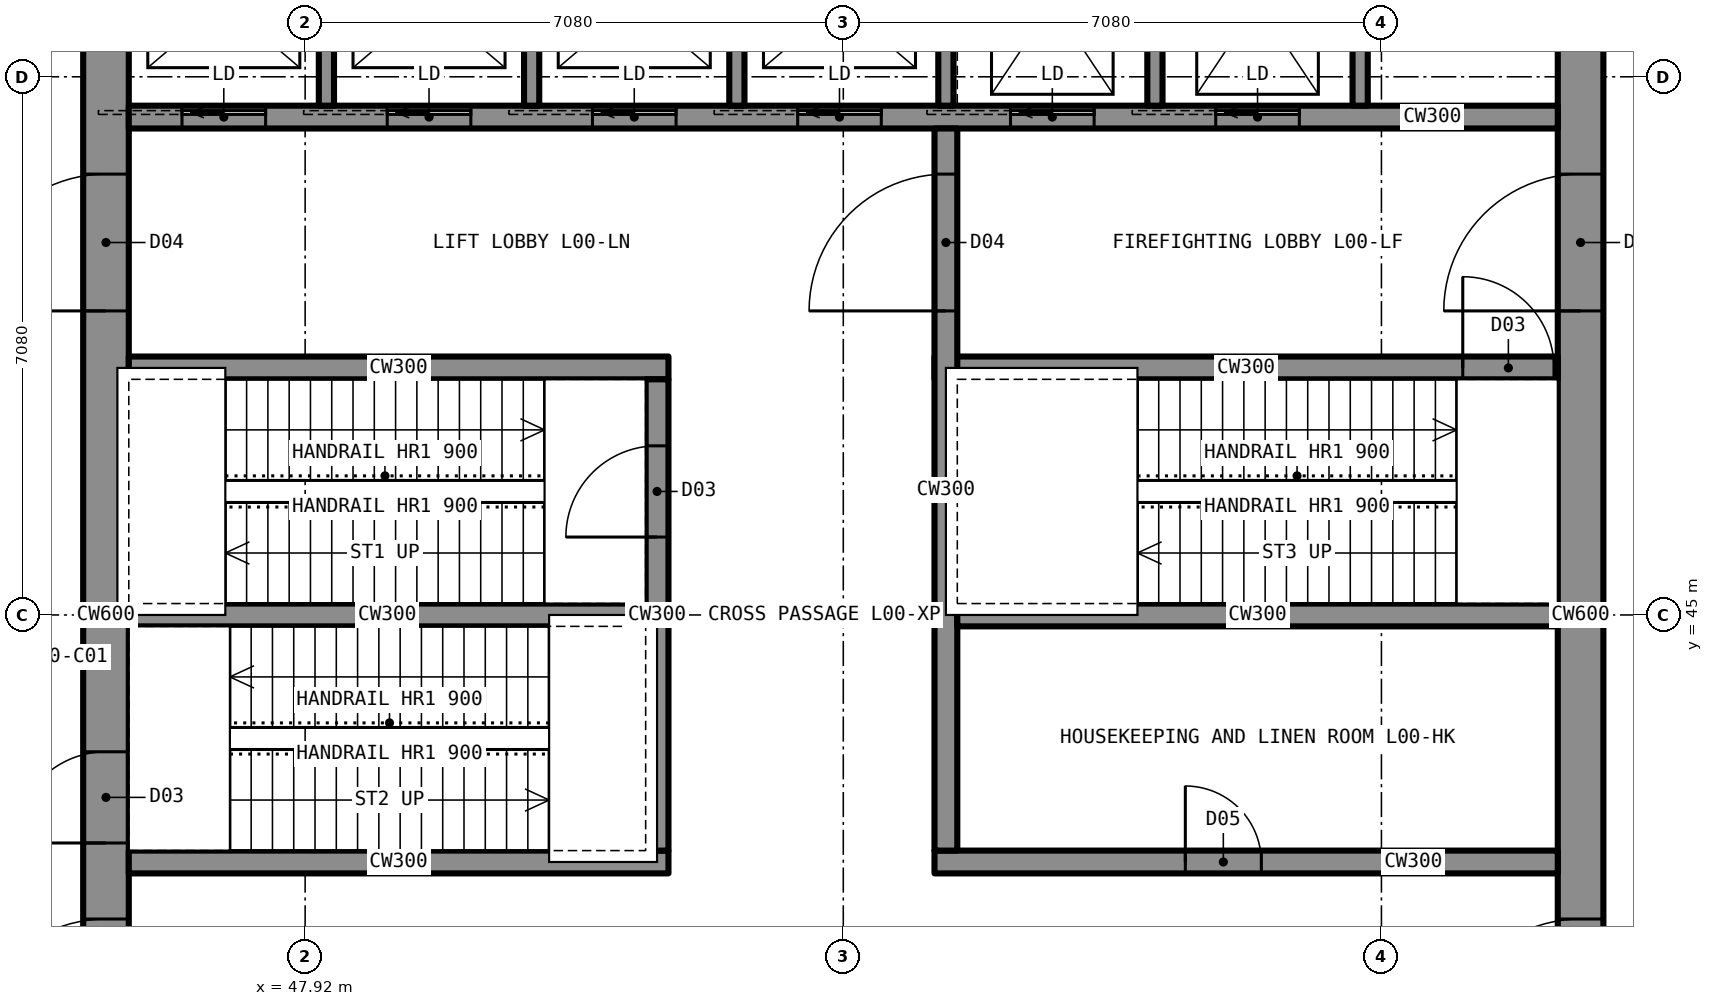
"""IFC4 building model, lengths in metres.
Left out: names, types, materials, properties, quantities, classifications, styles, units other than length and angle.
Written with IfcOpenShell. Run it as: python <this file> out.ifc"""

import sys

from ifc_helpers import new_model, si_unit, direction, frame, frame_2d, origin, place, context, subcontext, project, spatial, rectangle, extrude, element, fill, save


model = new_model("IFC4")
c1 = context("Model", 3, precision=1e-05, world=origin(), true_north=direction((0.0, 1.0)))
c2 = subcontext(c1, "Body", "Model", "MODEL_VIEW")
j1 = project(units=[si_unit("LENGTHUNIT", "METRE"), si_unit("PLANEANGLEUNIT", "RADIAN")], contexts=[c1])
p1 = place(None, origin())
s1 = spatial("IfcSite", under=j1, at=p1, CompositionType="ELEMENT")
p2 = place(p1, origin())
s2 = spatial("IfcBuilding", under=s1, at=p2, CompositionType="ELEMENT")
p3 = place(p2, origin())
s3 = spatial("IfcBuildingStorey", under=s2, at=p3, CompositionType="ELEMENT", Elevation=0.0)
p4 = place(p3, frame((64.7, 35.6, 0.0), z_axis=(0.0, 0.0, 1.0), x_axis=(0.0, 1.0, 0.0)))
e1 = element("IfcWall", 1, at=p4, inside=s3, PredefinedType="SHEAR", context=c2, shape_type="SweptSolid", body=[
    extrude(rectangle(XDim=18.8, YDim=0.6, at=frame_2d((9.4, 0.0))), origin(), (0.0, 0.0, 1.0), 5.6),
])
p5 = place(p4, frame((13.4, 0.0, 0.0)))
e2 = element("IfcOpeningElement", 2, at=p5, cuts=e1, PredefinedType="OPENING", context=c2, shape_type="SweptSolid", body=[
    extrude(rectangle(XDim=1.8, YDim=2.2, at=frame_2d((0.9, 1.1))), frame((0.0, 0.31, 0.0), z_axis=(0.0, -1.0, 0.0), x_axis=(1.0, 0.0, 0.0)), (0.0, 0.0, 1.0), 0.62),
])
p6 = place(p4, frame((3.6, 0.0, 0.0)))
e3 = element("IfcOpeningElement", 3, at=p6, cuts=e1, PredefinedType="OPENING", context=c2, shape_type="SweptSolid", body=[
    extrude(rectangle(XDim=1.8, YDim=2.2, at=frame_2d((0.9, 1.1))), frame((0.0, 0.31, 0.0), z_axis=(0.0, -1.0, 0.0), x_axis=(1.0, 0.0, 0.0)), (0.0, 0.0, 1.0), 0.62),
])
p7 = place(p3, frame((45.3, 35.6, 0.0), z_axis=(0.0, 0.0, 1.0), x_axis=(0.0, 1.0, 0.0)))
e4 = element("IfcWall", 4, at=p7, inside=s3, PredefinedType="SHEAR", context=c2, shape_type="SweptSolid", body=[
    extrude(rectangle(XDim=18.8, YDim=0.6, at=frame_2d((9.4, 0.0))), origin(), (0.0, 0.0, 1.0), 5.6),
])
p8 = place(p7, frame((13.4, 0.0, 0.0)))
e5 = element("IfcOpeningElement", 5, at=p8, cuts=e4, PredefinedType="OPENING", context=c2, shape_type="SweptSolid", body=[
    extrude(rectangle(XDim=1.8, YDim=2.2, at=frame_2d((0.9, 1.1))), frame((0.0, 0.31, 0.0), z_axis=(0.0, -1.0, 0.0), x_axis=(1.0, 0.0, 0.0)), (0.0, 0.0, 1.0), 0.62),
])
p9 = place(p7, frame((3.6, 0.0, 0.0)))
e6 = element("IfcOpeningElement", 6, at=p9, cuts=e4, PredefinedType="OPENING", context=c2, shape_type="SweptSolid", body=[
    extrude(rectangle(XDim=1.8, YDim=2.2, at=frame_2d((0.9, 1.1))), frame((0.0, 0.31, 0.0), z_axis=(0.0, -1.0, 0.0), x_axis=(1.0, 0.0, 0.0)), (0.0, 0.0, 1.0), 0.62),
])
p10 = place(p7, frame((6.4, 0.0, 0.0)))
e7 = element("IfcOpeningElement", 7, at=p10, cuts=e4, PredefinedType="OPENING", context=c2, shape_type="SweptSolid", body=[
    extrude(rectangle(XDim=1.2, YDim=2.2, at=frame_2d((0.6, 1.1))), frame((0.0, 0.31, 0.0), z_axis=(0.0, -1.0, 0.0), x_axis=(1.0, 0.0, 0.0)), (0.0, 0.0, 1.0), 0.62),
])
p11 = place(p3, frame((45.6, 51.55, 0.0), z_axis=(0.0, 0.0, 1.0), x_axis=(1.0, 0.0, 0.0)))
e8 = element("IfcWall", 8, at=p11, inside=s3, PredefinedType="SHEAR", context=c2, shape_type="SweptSolid", body=[
    extrude(rectangle(XDim=18.8, YDim=0.3, at=frame_2d((9.4, 0.0))), origin(), (0.0, 0.0, 1.0), 5.6),
])
p12 = place(p11, frame((0.7, 0.0, 0.0)))
e9 = element("IfcOpeningElement", 9, at=p12, cuts=e8, PredefinedType="OPENING", context=c2, shape_type="SweptSolid", body=[
    extrude(rectangle(XDim=1.1, YDim=2.2, at=frame_2d((0.55, 1.1))), frame((0.0, 0.16, 0.0), z_axis=(0.0, -1.0, 0.0), x_axis=(1.0, 0.0, 0.0)), (0.0, 0.0, 1.0), 0.32),
])
p13 = place(p11, frame((3.4, 0.0, 0.0)))
e10 = element("IfcOpeningElement", 10, at=p13, cuts=e8, PredefinedType="OPENING", context=c2, shape_type="SweptSolid", body=[
    extrude(rectangle(XDim=1.1, YDim=2.2, at=frame_2d((0.55, 1.1))), frame((0.0, 0.16, 0.0), z_axis=(0.0, -1.0, 0.0), x_axis=(1.0, 0.0, 0.0)), (0.0, 0.0, 1.0), 0.32),
])
p14 = place(p11, frame((6.1, 0.0, 0.0)))
e11 = element("IfcOpeningElement", 11, at=p14, cuts=e8, PredefinedType="OPENING", context=c2, shape_type="SweptSolid", body=[
    extrude(rectangle(XDim=1.1, YDim=2.2, at=frame_2d((0.55, 1.1))), frame((0.0, 0.16, 0.0), z_axis=(0.0, -1.0, 0.0), x_axis=(1.0, 0.0, 0.0)), (0.0, 0.0, 1.0), 0.32),
])
p15 = place(p11, frame((8.8, 0.0, 0.0)))
e12 = element("IfcOpeningElement", 12, at=p15, cuts=e8, PredefinedType="OPENING", context=c2, shape_type="SweptSolid", body=[
    extrude(rectangle(XDim=1.1, YDim=2.2, at=frame_2d((0.55, 1.1))), frame((0.0, 0.16, 0.0), z_axis=(0.0, -1.0, 0.0), x_axis=(1.0, 0.0, 0.0)), (0.0, 0.0, 1.0), 0.32),
])
p16 = place(p11, frame((11.6, 0.0, 0.0)))
e13 = element("IfcOpeningElement", 13, at=p16, cuts=e8, PredefinedType="OPENING", context=c2, shape_type="SweptSolid", body=[
    extrude(rectangle(XDim=1.1, YDim=2.2, at=frame_2d((0.55, 1.1))), frame((0.0, 0.16, 0.0), z_axis=(0.0, -1.0, 0.0), x_axis=(1.0, 0.0, 0.0)), (0.0, 0.0, 1.0), 0.32),
])
p17 = place(p11, frame((14.3, 0.0, 0.0)))
e14 = element("IfcOpeningElement", 14, at=p17, cuts=e8, PredefinedType="OPENING", context=c2, shape_type="SweptSolid", body=[
    extrude(rectangle(XDim=1.1, YDim=2.2, at=frame_2d((0.55, 1.1))), frame((0.0, 0.16, 0.0), z_axis=(0.0, -1.0, 0.0), x_axis=(1.0, 0.0, 0.0)), (0.0, 0.0, 1.0), 0.32),
])
p18 = place(p3, frame((45.6, 48.25, 0.0), z_axis=(0.0, 0.0, 1.0), x_axis=(1.0, 0.0, 0.0)))
e15 = element("IfcWall", 15, at=p18, inside=s3, PredefinedType="SHEAR", context=c2, shape_type="SweptSolid", body=[
    extrude(rectangle(XDim=7.1, YDim=0.3, at=frame_2d((3.55, 0.0))), origin(), (0.0, 0.0, 1.0), 5.6),
])
p19 = place(p3, frame((56.2, 48.25, 0.0), z_axis=(0.0, 0.0, 1.0), x_axis=(1.0, 0.0, 0.0)))
e16 = element("IfcWall", 16, at=p19, inside=s3, PredefinedType="SHEAR", context=c2, shape_type="SweptSolid", body=[
    extrude(rectangle(XDim=8.2, YDim=0.3, at=frame_2d((4.1, 0.0))), origin(), (0.0, 0.0, 1.0), 5.6),
])
p20 = place(p19, frame((6.95, 0.0, 0.0)))
e17 = element("IfcOpeningElement", 17, at=p20, cuts=e16, PredefinedType="OPENING", context=c2, shape_type="SweptSolid", body=[
    extrude(rectangle(XDim=1.2, YDim=2.2, at=frame_2d((0.6, 1.1))), frame((0.0, 0.16, 0.0), z_axis=(0.0, -1.0, 0.0), x_axis=(1.0, 0.0, 0.0)), (0.0, 0.0, 1.0), 0.32),
])
p21 = place(p3, frame((45.6, 41.75, 0.0), z_axis=(0.0, 0.0, 1.0), x_axis=(1.0, 0.0, 0.0)))
e18 = element("IfcWall", 18, at=p21, inside=s3, PredefinedType="SHEAR", context=c2, shape_type="SweptSolid", body=[
    extrude(rectangle(XDim=7.1, YDim=0.3, at=frame_2d((3.55, 0.0))), origin(), (0.0, 0.0, 1.0), 5.6),
])
p22 = place(p3, frame((56.2, 41.75, 0.0), z_axis=(0.0, 0.0, 1.0), x_axis=(1.0, 0.0, 0.0)))
e19 = element("IfcWall", 19, at=p22, inside=s3, PredefinedType="SHEAR", context=c2, shape_type="SweptSolid", body=[
    extrude(rectangle(XDim=8.2, YDim=0.3, at=frame_2d((4.1, 0.0))), origin(), (0.0, 0.0, 1.0), 5.6),
])
p23 = place(p22, frame((3.3, 0.0, 0.0)))
e20 = element("IfcOpeningElement", 20, at=p23, cuts=e19, PredefinedType="OPENING", context=c2, shape_type="SweptSolid", body=[
    extrude(rectangle(XDim=1.0, YDim=2.1, at=frame_2d((0.5, 1.05))), frame((0.0, 0.16, 0.0), z_axis=(0.0, -1.0, 0.0), x_axis=(1.0, 0.0, 0.0)), (0.0, 0.0, 1.0), 0.32),
])
p24 = place(p3, frame((52.55, 41.9, 0.0), z_axis=(0.0, 0.0, 1.0), x_axis=(0.0, 1.0, 0.0)))
e21 = element("IfcWall", 21, at=p24, inside=s3, PredefinedType="SHEAR", context=c2, shape_type="SweptSolid", body=[
    extrude(rectangle(XDim=6.2, YDim=0.3, at=frame_2d((3.1, 0.0))), origin(), (0.0, 0.0, 1.0), 5.6),
])
p25 = place(p24, frame((4.125, 0.0, 0.0)))
e22 = element("IfcOpeningElement", 22, at=p25, cuts=e21, PredefinedType="OPENING", context=c2, shape_type="SweptSolid", body=[
    extrude(rectangle(XDim=1.2, YDim=2.2, at=frame_2d((0.6, 1.1))), frame((0.0, 0.16, 0.0), z_axis=(0.0, -1.0, 0.0), x_axis=(1.0, 0.0, 0.0)), (0.0, 0.0, 1.0), 0.32),
])
p26 = place(p3, frame((56.35, 41.9, 0.0), z_axis=(0.0, 0.0, 1.0), x_axis=(0.0, 1.0, 0.0)))
e23 = element("IfcWall", 23, at=p26, inside=s3, PredefinedType="SHEAR", context=c2, shape_type="SweptSolid", body=[
    extrude(rectangle(XDim=9.5, YDim=0.3, at=frame_2d((4.75, 0.0))), origin(), (0.0, 0.0, 1.0), 5.6),
])
p27 = place(p26, frame((7.1, 0.0, 0.0)))
e24 = element("IfcOpeningElement", 24, at=p27, cuts=e23, PredefinedType="OPENING", context=c2, shape_type="SweptSolid", body=[
    extrude(rectangle(XDim=1.8, YDim=2.2, at=frame_2d((0.9, 1.1))), frame((0.0, 0.16, 0.0), z_axis=(0.0, -1.0, 0.0), x_axis=(1.0, 0.0, 0.0)), (0.0, 0.0, 1.0), 0.32),
])
p28 = place(p3, frame((45.6, 45.0, 0.0), z_axis=(0.0, 0.0, 1.0), x_axis=(1.0, 0.0, 0.0)))
e25 = element("IfcWall", 25, at=p28, inside=s3, PredefinedType="SHEAR", context=c2, shape_type="SweptSolid", body=[
    extrude(rectangle(XDim=6.8, YDim=0.3, at=frame_2d((3.4, 0.0))), origin(), (0.0, 0.0, 1.0), 5.6),
])
p29 = place(p3, frame((56.5, 45.0, 0.0), z_axis=(0.0, 0.0, 1.0), x_axis=(1.0, 0.0, 0.0)))
e26 = element("IfcWall", 26, at=p29, inside=s3, PredefinedType="SHEAR", context=c2, shape_type="SweptSolid", body=[
    extrude(rectangle(XDim=7.9, YDim=0.3, at=frame_2d((3.95, 0.0))), origin(), (0.0, 0.0, 1.0), 5.6),
])
for number, where, z_axis, x_axis in (
    (27, (48.2, 51.7, 0.0), (0.0, 0.0, 1.0), (0.0, 1.0, 0.0)),
    (28, (50.9, 51.7, 0.0), (0.0, 0.0, 1.0), (0.0, 1.0, 0.0)),
    (29, (53.6, 51.7, 0.0), (0.0, 0.0, 1.0), (0.0, 1.0, 0.0)),
    (30, (59.1, 51.7, 0.0), (0.0, 0.0, 1.0), (0.0, 1.0, 0.0)),
    (31, (61.8, 51.7, 0.0), (0.0, 0.0, 1.0), (0.0, 1.0, 0.0)),
    (32, (56.35, 51.7, 0.0), (0.0, 0.0, 1.0), (0.0, 1.0, 0.0)),
):
    element("IfcWall", number, at=place(p3, frame(where, z_axis=z_axis, x_axis=x_axis)), inside=s3, PredefinedType="PARTITIONING", context=c2, shape_type="SweptSolid", body=[
        extrude(rectangle(XDim=2.7, YDim=0.2, at=frame_2d((1.35, 0.0))), origin(), (0.0, 0.0, 1.0), 5.25),
    ])
p30 = place(p8, origin())
e33 = element("IfcDoor", 33, at=p30, inside=s3, OperationType="DOUBLE_DOOR_SINGLE_SWING", PredefinedType="DOOR", context=c2, shape_type="SweptSolid", body=[
    extrude(rectangle(XDim=1.8, YDim=2.2, at=frame_2d((0.9, 1.1))), frame((0.0, 0.025, 0.0), z_axis=(0.0, -1.0, 0.0), x_axis=(1.0, 0.0, 0.0)), (0.0, 0.0, 1.0), 0.05),
])
fill(e5, e33)
p31 = place(p9, origin())
e34 = element("IfcDoor", 34, at=p31, inside=s3, OperationType="DOUBLE_DOOR_SINGLE_SWING", PredefinedType="DOOR", context=c2, shape_type="SweptSolid", body=[
    extrude(rectangle(XDim=1.8, YDim=2.2, at=frame_2d((0.9, 1.1))), frame((0.0, 0.025, 0.0), z_axis=(0.0, -1.0, 0.0), x_axis=(1.0, 0.0, 0.0)), (0.0, 0.0, 1.0), 0.05),
])
fill(e6, e34)
p32 = place(p5, origin())
e35 = element("IfcDoor", 35, at=p32, inside=s3, OperationType="DOUBLE_DOOR_SINGLE_SWING", PredefinedType="DOOR", context=c2, shape_type="SweptSolid", body=[
    extrude(rectangle(XDim=1.8, YDim=2.2, at=frame_2d((0.9, 1.1))), frame((0.0, 0.025, 0.0), z_axis=(0.0, -1.0, 0.0), x_axis=(1.0, 0.0, 0.0)), (0.0, 0.0, 1.0), 0.05),
])
fill(e2, e35)
p33 = place(p6, origin())
e36 = element("IfcDoor", 36, at=p33, inside=s3, OperationType="DOUBLE_DOOR_SINGLE_SWING", PredefinedType="DOOR", context=c2, shape_type="SweptSolid", body=[
    extrude(rectangle(XDim=1.8, YDim=2.2, at=frame_2d((0.9, 1.1))), frame((0.0, 0.025, 0.0), z_axis=(0.0, -1.0, 0.0), x_axis=(1.0, 0.0, 0.0)), (0.0, 0.0, 1.0), 0.05),
])
fill(e3, e36)
p34 = place(p27, origin())
e37 = element("IfcDoor", 37, at=p34, inside=s3, OperationType="DOUBLE_DOOR_SINGLE_SWING", PredefinedType="DOOR", context=c2, shape_type="SweptSolid", body=[
    extrude(rectangle(XDim=1.8, YDim=2.2, at=frame_2d((0.9, 1.1))), frame((0.0, 0.025, 0.0), z_axis=(0.0, -1.0, 0.0), x_axis=(1.0, 0.0, 0.0)), (0.0, 0.0, 1.0), 0.05),
])
fill(e24, e37)
p35 = place(p25, origin())
e38 = element("IfcDoor", 38, at=p35, inside=s3, OperationType="SINGLE_SWING_LEFT", PredefinedType="DOOR", context=c2, shape_type="SweptSolid", body=[
    extrude(rectangle(XDim=1.2, YDim=2.2, at=frame_2d((0.6, 1.1))), frame((0.0, 0.025, 0.0), z_axis=(0.0, -1.0, 0.0), x_axis=(1.0, 0.0, 0.0)), (0.0, 0.0, 1.0), 0.05),
])
fill(e22, e38)
p36 = place(p10, origin())
e39 = element("IfcDoor", 39, at=p36, inside=s3, OperationType="SINGLE_SWING_LEFT", PredefinedType="DOOR", context=c2, shape_type="SweptSolid", body=[
    extrude(rectangle(XDim=1.2, YDim=2.2, at=frame_2d((0.6, 1.1))), frame((0.0, 0.025, 0.0), z_axis=(0.0, -1.0, 0.0), x_axis=(1.0, 0.0, 0.0)), (0.0, 0.0, 1.0), 0.05),
])
fill(e7, e39)
p37 = place(p20, origin())
e40 = element("IfcDoor", 40, at=p37, inside=s3, OperationType="SINGLE_SWING_LEFT", PredefinedType="DOOR", context=c2, shape_type="SweptSolid", body=[
    extrude(rectangle(XDim=1.2, YDim=2.2, at=frame_2d((0.6, 1.1))), frame((0.0, 0.025, 0.0), z_axis=(0.0, -1.0, 0.0), x_axis=(1.0, 0.0, 0.0)), (0.0, 0.0, 1.0), 0.05),
])
fill(e17, e40)
p38 = place(p23, origin())
e41 = element("IfcDoor", 41, at=p38, inside=s3, OperationType="SINGLE_SWING_LEFT", PredefinedType="DOOR", context=c2, shape_type="SweptSolid", body=[
    extrude(rectangle(XDim=1.0, YDim=2.1, at=frame_2d((0.5, 1.05))), frame((0.0, 0.025, 0.0), z_axis=(0.0, -1.0, 0.0), x_axis=(1.0, 0.0, 0.0)), (0.0, 0.0, 1.0), 0.05),
])
fill(e20, e41)
p39 = place(p12, origin())
e42 = element("IfcDoor", 42, at=p39, inside=s3, OperationType="SLIDING_TO_LEFT", PredefinedType="DOOR", context=c2, shape_type="SweptSolid", body=[
    extrude(rectangle(XDim=1.1, YDim=2.2, at=frame_2d((0.55, 1.1))), frame((0.0, 0.025, 0.0), z_axis=(0.0, -1.0, 0.0), x_axis=(1.0, 0.0, 0.0)), (0.0, 0.0, 1.0), 0.05),
])
fill(e9, e42)
p40 = place(p13, origin())
e43 = element("IfcDoor", 43, at=p40, inside=s3, OperationType="SLIDING_TO_LEFT", PredefinedType="DOOR", context=c2, shape_type="SweptSolid", body=[
    extrude(rectangle(XDim=1.1, YDim=2.2, at=frame_2d((0.55, 1.1))), frame((0.0, 0.025, 0.0), z_axis=(0.0, -1.0, 0.0), x_axis=(1.0, 0.0, 0.0)), (0.0, 0.0, 1.0), 0.05),
])
fill(e10, e43)
p41 = place(p14, origin())
e44 = element("IfcDoor", 44, at=p41, inside=s3, OperationType="SLIDING_TO_LEFT", PredefinedType="DOOR", context=c2, shape_type="SweptSolid", body=[
    extrude(rectangle(XDim=1.1, YDim=2.2, at=frame_2d((0.55, 1.1))), frame((0.0, 0.025, 0.0), z_axis=(0.0, -1.0, 0.0), x_axis=(1.0, 0.0, 0.0)), (0.0, 0.0, 1.0), 0.05),
])
fill(e11, e44)
p42 = place(p15, origin())
e45 = element("IfcDoor", 45, at=p42, inside=s3, OperationType="SLIDING_TO_LEFT", PredefinedType="DOOR", context=c2, shape_type="SweptSolid", body=[
    extrude(rectangle(XDim=1.1, YDim=2.2, at=frame_2d((0.55, 1.1))), frame((0.0, 0.025, 0.0), z_axis=(0.0, -1.0, 0.0), x_axis=(1.0, 0.0, 0.0)), (0.0, 0.0, 1.0), 0.05),
])
fill(e12, e45)
p43 = place(p16, origin())
e46 = element("IfcDoor", 46, at=p43, inside=s3, OperationType="SLIDING_TO_LEFT", PredefinedType="DOOR", context=c2, shape_type="SweptSolid", body=[
    extrude(rectangle(XDim=1.1, YDim=2.2, at=frame_2d((0.55, 1.1))), frame((0.0, 0.025, 0.0), z_axis=(0.0, -1.0, 0.0), x_axis=(1.0, 0.0, 0.0)), (0.0, 0.0, 1.0), 0.05),
])
fill(e13, e46)
p44 = place(p17, origin())
e47 = element("IfcDoor", 47, at=p44, inside=s3, OperationType="SLIDING_TO_LEFT", PredefinedType="DOOR", context=c2, shape_type="SweptSolid", body=[
    extrude(rectangle(XDim=1.1, YDim=2.2, at=frame_2d((0.55, 1.1))), frame((0.0, 0.025, 0.0), z_axis=(0.0, -1.0, 0.0), x_axis=(1.0, 0.0, 0.0)), (0.0, 0.0, 1.0), 0.05),
])
fill(e14, e47)
save(model, sys.argv[1])
